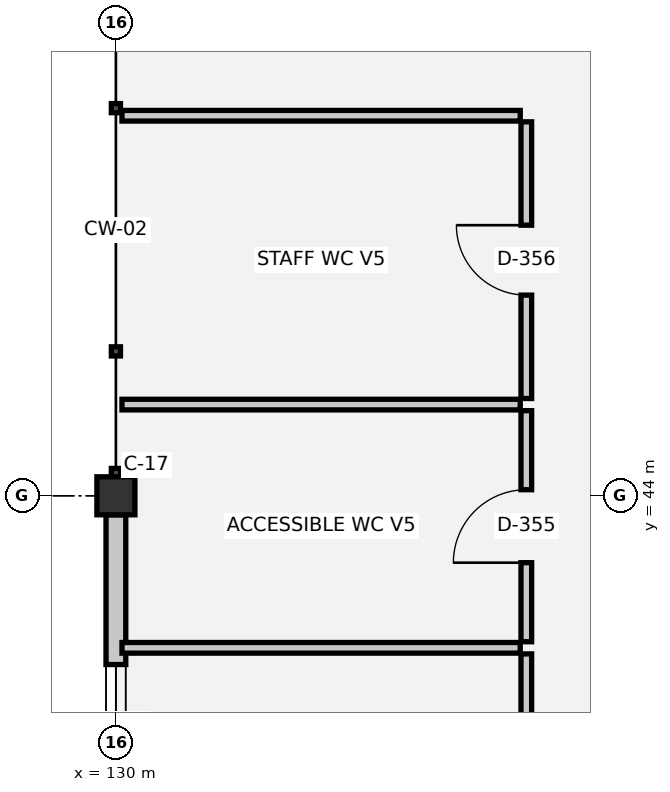
"""IFC4 building model, lengths in metres.
Left out: names, types, materials, properties, quantities, classifications, styles, units other than length and angle.
Written with IfcOpenShell. Run it as: python <this file> out.ifc"""

import sys

from ifc_helpers import new_model, si_unit, direction, frame, frame_2d, origin, origin_2d, place, context, subcontext, project, spatial, rectangle, extrude, element, fill, save


model = new_model("IFC4")
c1 = context("Model", 3, precision=1e-05, world=origin(), true_north=direction((0.0, 1.0)))
c2 = subcontext(c1, "Body", "Model", "MODEL_VIEW")
j1 = project(units=[si_unit("LENGTHUNIT", "METRE"), si_unit("PLANEANGLEUNIT", "RADIAN")], contexts=[c1])
p1 = place(None, origin())
s1 = spatial("IfcSite", under=j1, at=p1, CompositionType="ELEMENT")
p2 = place(p1, origin())
s2 = spatial("IfcBuilding", under=s1, at=p2, CompositionType="ELEMENT")
p3 = place(p2, frame((0.0, 0.0, 25.8)))
s3 = spatial("IfcBuildingStorey", under=s2, at=p3, CompositionType="ELEMENT", Elevation=25.8)
p4 = place(p3, frame((130.0, 44.0, 0.0), z_axis=(0.0, 0.0, 1.0), x_axis=(1.0, 0.0, 0.0)))
e1 = element("IfcColumn", 1, at=p4, inside=s3, PredefinedType="COLUMN", context=c2, shape_type="SweptSolid", body=[
    extrude(rectangle(XDim=0.5, YDim=0.5, at=origin_2d()), origin(), (0.0, 0.0, 1.0), 3.75),
])
p5 = place(p3, frame((130.0, 38.25, 0.0), z_axis=(0.0, 0.0, 1.0), x_axis=(0.0, 1.0, 0.0)))
e2 = element("IfcWall", 2, at=p5, inside=s3, PredefinedType="SOLIDWALL", context=c2, shape_type="SweptSolid", body=[
    extrude(rectangle(XDim=5.5, YDim=0.26, at=frame_2d((2.75, 0.0))), origin(), (0.0, 0.0, 1.0), 2.55),
])
p6 = place(p5, frame((1.33, 0.0, 1.0)))
e3 = element("IfcOpeningElement", 3, at=p6, cuts=e2, PredefinedType="OPENING", context=c2, shape_type="SweptSolid", body=[
    extrude(rectangle(XDim=2.2, YDim=1.0, at=frame_2d((1.1, 0.5))), frame((0.0, 0.14, 0.0), z_axis=(0.0, -1.0, 0.0), x_axis=(1.0, 0.0, 0.0)), (0.0, 0.0, 1.0), 0.28),
])
for number, where, z_axis, x_axis in (
    (4, (130.08, 42.0, 0.0), (0.0, 0.0, 1.0), (1.0, 0.0, 0.0)),
    (5, (130.08, 45.2, 0.0), (0.0, 0.0, 1.0), (1.0, 0.0, 0.0)),
    (6, (130.08, 49.0, 0.0), (0.0, 0.0, 1.0), (1.0, 0.0, 0.0)),
):
    element("IfcWall", number, at=place(p3, frame(where, z_axis=z_axis, x_axis=x_axis)), inside=s3, PredefinedType="PLUMBINGWALL", context=c2, shape_type="SweptSolid", body=[
        extrude(rectangle(XDim=5.24, YDim=0.14, at=frame_2d((2.62, 0.0))), origin(), (0.0, 0.0, 1.0), 3.39),
    ])
p7 = place(p3, frame((135.4, 38.08, 0.0), z_axis=(0.0, 0.0, 1.0), x_axis=(0.0, 1.0, 0.0)))
e7 = element("IfcWall", 7, at=p7, inside=s3, PredefinedType="PLUMBINGWALL", context=c2, shape_type="SweptSolid", body=[
    extrude(rectangle(XDim=3.84, YDim=0.14, at=frame_2d((1.92, 0.0))), origin(), (0.0, 0.0, 1.0), 3.39),
])
p8 = place(p7, frame((1.46, 0.0, 0.0)))
e8 = element("IfcOpeningElement", 8, at=p8, cuts=e7, PredefinedType="OPENING", context=c2, shape_type="SweptSolid", body=[
    extrude(rectangle(XDim=0.92, YDim=2.1, at=frame_2d((0.46, 1.05))), frame((0.0, 0.08, 0.0), z_axis=(0.0, -1.0, 0.0), x_axis=(1.0, 0.0, 0.0)), (0.0, 0.0, 1.0), 0.16),
])
p9 = place(p3, frame((135.4, 42.08, 0.0), z_axis=(0.0, 0.0, 1.0), x_axis=(0.0, 1.0, 0.0)))
e9 = element("IfcWall", 9, at=p9, inside=s3, PredefinedType="PLUMBINGWALL", context=c2, shape_type="SweptSolid", body=[
    extrude(rectangle(XDim=3.04, YDim=0.14, at=frame_2d((1.52, 0.0))), origin(), (0.0, 0.0, 1.0), 3.39),
])
p10 = place(p9, frame((1.04, 0.0, 0.0)))
e10 = element("IfcOpeningElement", 10, at=p10, cuts=e9, PredefinedType="OPENING", context=c2, shape_type="SweptSolid", body=[
    extrude(rectangle(XDim=0.96, YDim=2.1, at=frame_2d((0.48, 1.05))), frame((0.0, 0.08, 0.0), z_axis=(0.0, -1.0, 0.0), x_axis=(1.0, 0.0, 0.0)), (0.0, 0.0, 1.0), 0.16),
])
p11 = place(p3, frame((135.4, 45.28, 0.0), z_axis=(0.0, 0.0, 1.0), x_axis=(0.0, 1.0, 0.0)))
e11 = element("IfcWall", 11, at=p11, inside=s3, PredefinedType="PLUMBINGWALL", context=c2, shape_type="SweptSolid", body=[
    extrude(rectangle(XDim=3.64, YDim=0.14, at=frame_2d((1.82, 0.0))), origin(), (0.0, 0.0, 1.0), 3.39),
])
p12 = place(p11, frame((1.36, 0.0, 0.0)))
e12 = element("IfcOpeningElement", 12, at=p12, cuts=e11, PredefinedType="OPENING", context=c2, shape_type="SweptSolid", body=[
    extrude(rectangle(XDim=0.92, YDim=2.1, at=frame_2d((0.46, 1.05))), frame((0.0, 0.08, 0.0), z_axis=(0.0, -1.0, 0.0), x_axis=(1.0, 0.0, 0.0)), (0.0, 0.0, 1.0), 0.16),
])
p13 = place(p6, origin())
e13 = element("IfcWindow", 13, at=p13, inside=s3, PartitioningType="SINGLE_PANEL", PredefinedType="WINDOW", context=c2, shape_type="SweptSolid", body=[
    extrude(rectangle(XDim=2.2, YDim=1.0, at=frame_2d((1.1, 0.5))), frame((0.0, 0.03, 0.0), z_axis=(0.0, -1.0, 0.0), x_axis=(1.0, 0.0, 0.0)), (0.0, 0.0, 1.0), 0.06),
])
fill(e3, e13)
p14 = place(p10, origin())
e14 = element("IfcDoor", 14, at=p14, inside=s3, OperationType="SINGLE_SWING_LEFT", PredefinedType="DOOR", context=c2, shape_type="SweptSolid", body=[
    extrude(rectangle(XDim=0.96, YDim=2.1, at=frame_2d((0.48, 1.05))), frame((0.0, 0.025, 0.0), z_axis=(0.0, -1.0, 0.0), x_axis=(1.0, 0.0, 0.0)), (0.0, 0.0, 1.0), 0.05),
])
fill(e10, e14)
p15 = place(p12, origin())
e15 = element("IfcDoor", 15, at=p15, inside=s3, OperationType="SINGLE_SWING_RIGHT", PredefinedType="DOOR", context=c2, shape_type="SweptSolid", body=[
    extrude(rectangle(XDim=0.92, YDim=2.1, at=frame_2d((0.46, 1.05))), frame((0.0, 0.025, 0.0), z_axis=(0.0, -1.0, 0.0), x_axis=(1.0, 0.0, 0.0)), (0.0, 0.0, 1.0), 0.05),
])
fill(e12, e15)
save(model, sys.argv[1])
